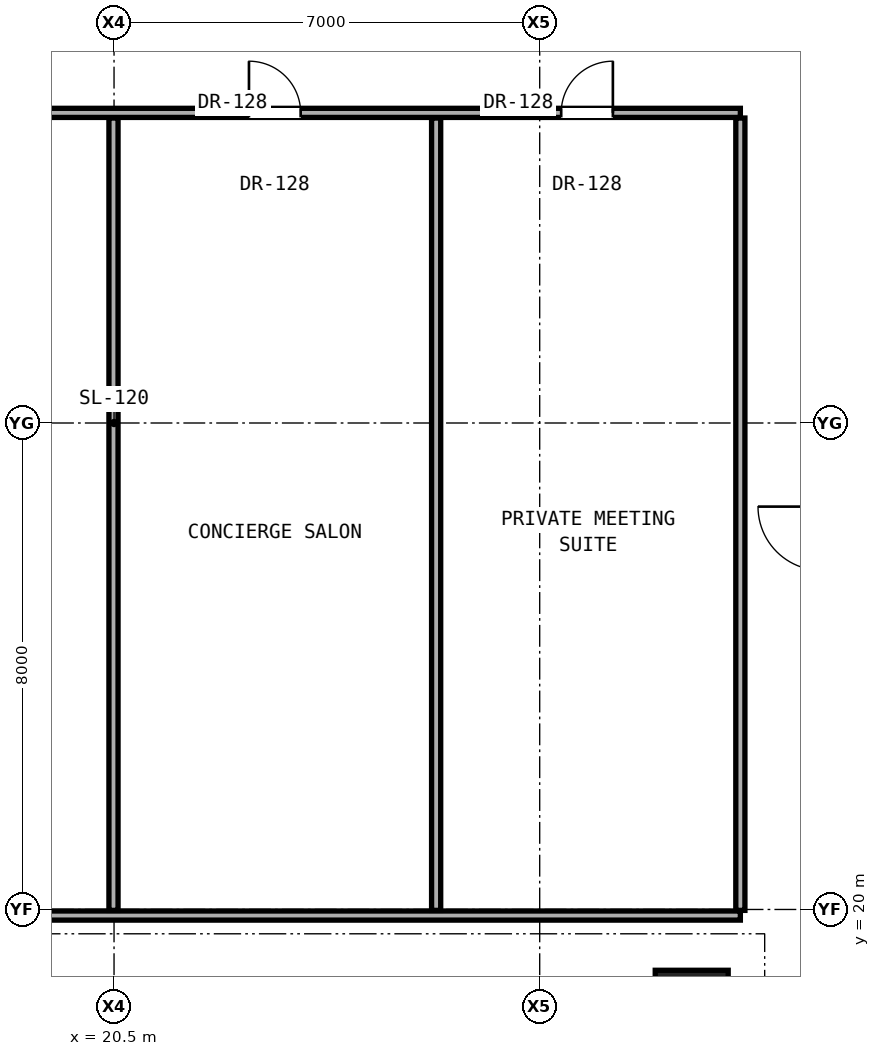
"""IFC4 building model, lengths in metres.
Left out: names, types, materials, properties, quantities, classifications, styles, units other than length and angle.
Written with IfcOpenShell. Run it as: python <this file> out.ifc"""

import sys

from ifc_helpers import new_model, si_unit, direction, frame, frame_2d, origin, origin_2d, place, context, subcontext, project, spatial, rectangle, extrude, element, fill, save


model = new_model("IFC4")
c1 = context("Model", 3, precision=1e-05, world=origin(), true_north=direction((0.0, 1.0)))
c2 = subcontext(c1, "Body", "Model", "MODEL_VIEW")
j1 = project(units=[si_unit("LENGTHUNIT", "METRE"), si_unit("PLANEANGLEUNIT", "RADIAN")], contexts=[c1])
p1 = place(None, origin())
s1 = spatial("IfcSite", under=j1, at=p1, CompositionType="ELEMENT")
p2 = place(p1, origin())
s2 = spatial("IfcBuilding", under=s1, at=p2, CompositionType="ELEMENT")
p3 = place(p2, frame((0.0, 0.0, 91.7)))
s3 = spatial("IfcBuildingStorey", under=s2, at=p3, CompositionType="ELEMENT", Elevation=91.7)
p4 = place(p3, frame((30.0, 18.4, 0.0), z_axis=(0.0, 0.0, 1.0), x_axis=(1.0, 0.0, 0.0)))
e1 = element("IfcColumn", 1, at=p4, inside=s3, PredefinedType="COLUMN", context=c2, shape_type="SweptSolid", body=[
    extrude(rectangle(XDim=1.2, YDim=1.2, at=origin_2d()), origin(), (0.0, 0.0, 1.0), 3.3),
])
p5 = place(p3, frame((10.2, 19.9, 0.0), z_axis=(0.0, 0.0, 1.0), x_axis=(1.0, 0.0, 0.0)))
e2 = element("IfcWall", 2, at=p5, inside=s3, PredefinedType="PARTITIONING", context=c2, shape_type="SweptSolid", body=[
    extrude(rectangle(XDim=20.6, YDim=0.15, at=frame_2d((10.3, 0.0))), origin(), (0.0, 0.0, 1.0), 2.124),
])
p6 = place(p5, frame((1.67, 0.0, 0.0)))
e3 = element("IfcOpeningElement", 3, at=p6, cuts=e2, PredefinedType="OPENING", context=c2, shape_type="SweptSolid", body=[
    extrude(rectangle(XDim=0.9, YDim=2.1, at=frame_2d((0.45, 1.05))), frame((0.0, 0.085, 0.0), z_axis=(0.0, -1.0, 0.0), x_axis=(1.0, 0.0, 0.0)), (0.0, 0.0, 1.0), 0.17),
])
p7 = place(p5, frame((3.795, 0.0, 0.0)))
e4 = element("IfcOpeningElement", 4, at=p7, cuts=e2, PredefinedType="OPENING", context=c2, shape_type="SweptSolid", body=[
    extrude(rectangle(XDim=0.85, YDim=2.01, at=frame_2d((0.425, 1.005))), frame((0.0, 0.085, 0.0), z_axis=(0.0, -1.0, 0.0), x_axis=(1.0, 0.0, 0.0)), (0.0, 0.0, 1.0), 0.17),
])
p8 = place(p5, frame((7.44, 0.0, 0.0)))
e5 = element("IfcOpeningElement", 5, at=p8, cuts=e2, PredefinedType="OPENING", context=c2, shape_type="SweptSolid", body=[
    extrude(rectangle(XDim=0.85, YDim=2.01, at=frame_2d((0.425, 1.005))), frame((0.0, 0.085, 0.0), z_axis=(0.0, -1.0, 0.0), x_axis=(1.0, 0.0, 0.0)), (0.0, 0.0, 1.0), 0.17),
])
p9 = place(p3, frame((10.2, 33.1, 0.0), z_axis=(0.0, 0.0, 1.0), x_axis=(1.0, 0.0, 0.0)))
e6 = element("IfcWall", 6, at=p9, inside=s3, PredefinedType="PARTITIONING", context=c2, shape_type="SweptSolid", body=[
    extrude(rectangle(XDim=20.6, YDim=0.15, at=frame_2d((10.3, 0.0))), origin(), (0.0, 0.0, 1.0), 2.124),
])
p10 = place(p9, frame((12.519, 0.0, 0.0)))
e7 = element("IfcOpeningElement", 7, at=p10, cuts=e6, PredefinedType="OPENING", context=c2, shape_type="SweptSolid", body=[
    extrude(rectangle(XDim=0.85, YDim=2.01, at=frame_2d((0.425, 1.005))), frame((0.0, 0.085, 0.0), z_axis=(0.0, -1.0, 0.0), x_axis=(1.0, 0.0, 0.0)), (0.0, 0.0, 1.0), 0.17),
])
p11 = place(p9, frame((17.654, 0.0, 0.0)))
e8 = element("IfcOpeningElement", 8, at=p11, cuts=e6, PredefinedType="OPENING", context=c2, shape_type="SweptSolid", body=[
    extrude(rectangle(XDim=0.85, YDim=2.01, at=frame_2d((0.425, 1.005))), frame((0.0, 0.085, 0.0), z_axis=(0.0, -1.0, 0.0), x_axis=(1.0, 0.0, 0.0)), (0.0, 0.0, 1.0), 0.17),
])
for number, where, z_axis, x_axis in (
    (9, (20.491, 19.985, 0.0), (0.0, 0.0, 1.0), (0.0, 1.0, 0.0)),
    (10, (25.797, 19.985, 0.0), (0.0, 0.0, 1.0), (0.0, 1.0, 0.0)),
):
    element("IfcWall", number, at=place(p3, frame(where, z_axis=z_axis, x_axis=x_axis)), inside=s3, PredefinedType="PARTITIONING", context=c2, shape_type="SweptSolid", body=[
        extrude(rectangle(XDim=13.03, YDim=0.15, at=frame_2d((6.515, 0.0))), origin(), (0.0, 0.0, 1.0), 2.124),
    ])
p12 = place(p3, frame((30.8, 19.985, 0.0), z_axis=(0.0, 0.0, 1.0), x_axis=(0.0, 1.0, 0.0)))
e11 = element("IfcWall", 11, at=p12, inside=s3, PredefinedType="PARTITIONING", context=c2, shape_type="SweptSolid", body=[
    extrude(rectangle(XDim=13.03, YDim=0.15, at=frame_2d((6.515, 0.0))), origin(), (0.0, 0.0, 1.0), 2.299),
])
p13 = place(p10, origin())
e12 = element("IfcDoor", 12, at=p13, inside=s3, OperationType="SINGLE_SWING_LEFT", PredefinedType="DOOR", context=c2, shape_type="SweptSolid", body=[
    extrude(rectangle(XDim=0.85, YDim=2.01, at=frame_2d((0.425, 1.005))), frame((0.0, 0.025, 0.0), z_axis=(0.0, -1.0, 0.0), x_axis=(1.0, 0.0, 0.0)), (0.0, 0.0, 1.0), 0.05),
])
fill(e7, e12)
p14 = place(p11, origin())
e13 = element("IfcDoor", 13, at=p14, inside=s3, OperationType="SINGLE_SWING_RIGHT", PredefinedType="DOOR", context=c2, shape_type="SweptSolid", body=[
    extrude(rectangle(XDim=0.85, YDim=2.01, at=frame_2d((0.425, 1.005))), frame((0.0, 0.025, 0.0), z_axis=(0.0, -1.0, 0.0), x_axis=(1.0, 0.0, 0.0)), (0.0, 0.0, 1.0), 0.05),
])
fill(e8, e13)
save(model, sys.argv[1])
